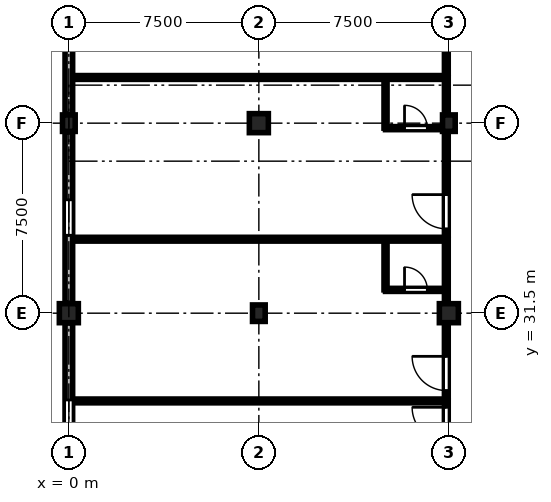
"""IFC4 building model, lengths in metres.
Left out: names, types, materials, properties, quantities, classifications, styles, units other than length and angle.
Written with IfcOpenShell. Run it as: python <this file> out.ifc"""

import sys

from ifc_helpers import new_model, si_unit, direction, frame, frame_2d, origin, origin_2d, place, context, subcontext, project, spatial, rectangle, extrude, element, fill, save


model = new_model("IFC4")
c1 = context("Model", 3, precision=1e-05, world=origin(), true_north=direction((0.0, 1.0)))
c2 = subcontext(c1, "Body", "Model", "MODEL_VIEW")
j1 = project(units=[si_unit("LENGTHUNIT", "METRE"), si_unit("PLANEANGLEUNIT", "RADIAN")], contexts=[c1])
p1 = place(None, origin())
s1 = spatial("IfcSite", under=j1, at=p1, CompositionType="ELEMENT")
p2 = place(p1, origin())
s2 = spatial("IfcBuilding", under=s1, at=p2, CompositionType="ELEMENT")
p3 = place(p2, frame((0.0, 0.0, 14.1)))
s3 = spatial("IfcBuildingStorey", under=s2, at=p3, CompositionType="ELEMENT", Elevation=14.1)
p4 = place(p3, frame((0.0, 31.5, 0.0), z_axis=(0.0, 0.0, 1.0), x_axis=(1.0, 0.0, 0.0)))
e1 = element("IfcColumn", 1, at=p4, inside=s3, PredefinedType="COLUMN", context=c2, shape_type="SweptSolid", body=[
    extrude(rectangle(XDim=0.75, YDim=0.75, at=origin_2d()), origin(), (0.0, 0.0, 1.0), 3.75),
])
for number, where, z_axis, x_axis in (
    (2, (0.0, 39.0, 0.0), (0.0, 0.0, 1.0), (1.0, 0.0, 0.0)),
    (3, (7.5, 31.5, 0.0), (0.0, 0.0, 1.0), (1.0, 0.0, 0.0)),
):
    element("IfcColumn", number, at=place(p3, frame(where, z_axis=z_axis, x_axis=x_axis)), inside=s3, PredefinedType="COLUMN", context=c2, shape_type="SweptSolid", body=[
        extrude(rectangle(XDim=0.5, YDim=0.65, at=origin_2d()), origin(), (0.0, 0.0, 1.0), 3.75),
    ])
for number, where, z_axis, x_axis in (
    (4, (7.5, 39.0, 0.0), (0.0, 0.0, 1.0), (1.0, 0.0, 0.0)),
    (5, (15.0, 31.5, 0.0), (0.0, 0.0, 1.0), (1.0, 0.0, 0.0)),
):
    element("IfcColumn", number, at=place(p3, frame(where, z_axis=z_axis, x_axis=x_axis)), inside=s3, PredefinedType="COLUMN", context=c2, shape_type="SweptSolid", body=[
        extrude(rectangle(XDim=0.75, YDim=0.75, at=origin_2d()), origin(), (0.0, 0.0, 1.0), 3.75),
    ])
p5 = place(p3, frame((15.0, 39.0, 0.0), z_axis=(0.0, 0.0, 1.0), x_axis=(1.0, 0.0, 0.0)))
e6 = element("IfcColumn", 6, at=p5, inside=s3, PredefinedType="COLUMN", context=c2, shape_type="SweptSolid", body=[
    extrude(rectangle(XDim=0.5, YDim=0.65, at=origin_2d()), origin(), (0.0, 0.0, 1.0), 3.75),
])
p6 = place(p3, frame((0.0, 22.835, 0.0), z_axis=(0.0, 0.0, 1.0), x_axis=(0.0, 1.0, 0.0)))
e7 = element("IfcWall", 7, at=p6, inside=s3, PredefinedType="STANDARD", context=c2, shape_type="SweptSolid", body=[
    extrude(rectangle(XDim=8.28, YDim=0.3, at=frame_2d((4.14, 0.0))), origin(), (0.0, 0.0, 1.0), 2.92),
])
p7 = place(p6, frame((3.04, 0.0, 0.9)))
e8 = element("IfcOpeningElement", 8, at=p7, cuts=e7, PredefinedType="OPENING", context=c2, shape_type="SweptSolid", body=[
    extrude(rectangle(XDim=2.2, YDim=1.74, at=frame_2d((1.1, 0.87))), frame((0.0, 0.16, 0.0), z_axis=(0.0, -1.0, 0.0), x_axis=(1.0, 0.0, 0.0)), (0.0, 0.0, 1.0), 0.32),
])
p8 = place(p3, frame((0.0, 31.885, 0.0), z_axis=(0.0, 0.0, 1.0), x_axis=(0.0, 1.0, 0.0)))
e9 = element("IfcWall", 9, at=p8, inside=s3, PredefinedType="STANDARD", context=c2, shape_type="SweptSolid", body=[
    extrude(rectangle(XDim=6.78, YDim=0.3, at=frame_2d((3.39, 0.0))), origin(), (0.0, 0.0, 1.0), 2.87),
])
p9 = place(p8, frame((2.69, 0.0, 0.9)))
e10 = element("IfcOpeningElement", 10, at=p9, cuts=e9, PredefinedType="OPENING", context=c2, shape_type="SweptSolid", body=[
    extrude(rectangle(XDim=1.4, YDim=1.69, at=frame_2d((0.7, 0.845))), frame((0.0, 0.16, 0.0), z_axis=(0.0, -1.0, 0.0), x_axis=(1.0, 0.0, 0.0)), (0.0, 0.0, 1.0), 0.32),
])
p10 = place(p3, frame((0.0, 39.335, 0.0), z_axis=(0.0, 0.0, 1.0), x_axis=(0.0, 1.0, 0.0)))
e11 = element("IfcWall", 11, at=p10, inside=s3, PredefinedType="STANDARD", context=c2, shape_type="SweptSolid", body=[
    extrude(rectangle(XDim=6.78, YDim=0.3, at=frame_2d((3.39, 0.0))), origin(), (0.0, 0.0, 1.0), 2.87),
])
p11 = place(p10, frame((2.59, 0.0, 0.9)))
e12 = element("IfcOpeningElement", 12, at=p11, cuts=e11, PredefinedType="OPENING", context=c2, shape_type="SweptSolid", body=[
    extrude(rectangle(XDim=1.6, YDim=1.69, at=frame_2d((0.8, 0.845))), frame((0.0, 0.16, 0.0), z_axis=(0.0, -1.0, 0.0), x_axis=(1.0, 0.0, 0.0)), (0.0, 0.0, 1.0), 0.32),
])
p12 = place(p3, frame((14.9, 21.813, 0.0), z_axis=(0.0, 0.0, 1.0), x_axis=(0.0, 1.0, 0.0)))
e13 = element("IfcWall", 13, at=p12, inside=s3, PredefinedType="PARTITIONING", context=c2, shape_type="SweptSolid", body=[
    extrude(rectangle(XDim=6.223, YDim=0.15, at=frame_2d((3.112, 0.0))), origin(), (0.0, 0.0, 1.0), 2.755),
])
p13 = place(p12, frame((4.623, 0.0, 0.0)))
e14 = element("IfcOpeningElement", 14, at=p13, cuts=e13, PredefinedType="OPENING", context=c2, shape_type="SweptSolid", body=[
    extrude(rectangle(XDim=1.35, YDim=2.25, at=frame_2d((0.675, 1.125))), frame((0.0, 0.085, 0.0), z_axis=(0.0, -1.0, 0.0), x_axis=(1.0, 0.0, 0.0)), (0.0, 0.0, 1.0), 0.17),
])
p14 = place(p3, frame((14.9, 28.197, 0.0), z_axis=(0.0, 0.0, 1.0), x_axis=(0.0, 1.0, 0.0)))
e15 = element("IfcWall", 15, at=p14, inside=s3, PredefinedType="PARTITIONING", context=c2, shape_type="SweptSolid", body=[
    extrude(rectangle(XDim=6.223, YDim=0.15, at=frame_2d((3.112, 0.0))), origin(), (0.0, 0.0, 1.0), 2.755),
])
p15 = place(p14, frame((0.25, 0.0, 0.0)))
e16 = element("IfcOpeningElement", 16, at=p15, cuts=e15, PredefinedType="OPENING", context=c2, shape_type="SweptSolid", body=[
    extrude(rectangle(XDim=1.35, YDim=2.25, at=frame_2d((0.675, 1.125))), frame((0.0, 0.085, 0.0), z_axis=(0.0, -1.0, 0.0), x_axis=(1.0, 0.0, 0.0)), (0.0, 0.0, 1.0), 0.17),
])
p16 = place(p3, frame((12.5, 32.42, 0.0), z_axis=(0.0, 0.0, 1.0), x_axis=(1.0, 0.0, 0.0)))
e17 = element("IfcWall", 17, at=p16, inside=s3, PredefinedType="PARTITIONING", context=c2, shape_type="SweptSolid", body=[
    extrude(rectangle(XDim=2.4, YDim=0.12, at=frame_2d((1.2, 0.0))), origin(), (0.0, 0.0, 1.0), 3.455),
])
p17 = place(p16, frame((0.75, 0.0, 0.0)))
e18 = element("IfcOpeningElement", 18, at=p17, cuts=e17, PredefinedType="OPENING", context=c2, shape_type="SweptSolid", body=[
    extrude(rectangle(XDim=0.9, YDim=2.1, at=frame_2d((0.45, 1.05))), frame((0.0, 0.07, 0.0), z_axis=(0.0, -1.0, 0.0), x_axis=(1.0, 0.0, 0.0)), (0.0, 0.0, 1.0), 0.14),
])
p18 = place(p3, frame((12.5, 32.42, 0.0), z_axis=(0.0, 0.0, 1.0), x_axis=(0.0, 1.0, 0.0)))
e19 = element("IfcWall", 19, at=p18, inside=s3, PredefinedType="PARTITIONING", context=c2, shape_type="SweptSolid", body=[
    extrude(rectangle(XDim=2.0, YDim=0.12, at=frame_2d((1.0, 0.0))), origin(), (0.0, 0.0, 1.0), 3.455),
])
p19 = place(p3, frame((14.9, 34.58, 0.0), z_axis=(0.0, 0.0, 1.0), x_axis=(0.0, 1.0, 0.0)))
e20 = element("IfcWall", 20, at=p19, inside=s3, PredefinedType="PARTITIONING", context=c2, shape_type="SweptSolid", body=[
    extrude(rectangle(XDim=6.223, YDim=0.15, at=frame_2d((3.112, 0.0))), origin(), (0.0, 0.0, 1.0), 2.905),
])
p20 = place(p19, frame((0.25, 0.0, 0.0)))
e21 = element("IfcOpeningElement", 21, at=p20, cuts=e20, PredefinedType="OPENING", context=c2, shape_type="SweptSolid", body=[
    extrude(rectangle(XDim=1.35, YDim=2.25, at=frame_2d((0.675, 1.125))), frame((0.0, 0.085, 0.0), z_axis=(0.0, -1.0, 0.0), x_axis=(1.0, 0.0, 0.0)), (0.0, 0.0, 1.0), 0.17),
])
p21 = place(p3, frame((12.5, 38.803, 0.0), z_axis=(0.0, 0.0, 1.0), x_axis=(1.0, 0.0, 0.0)))
e22 = element("IfcWall", 22, at=p21, inside=s3, PredefinedType="PARTITIONING", context=c2, shape_type="SweptSolid", body=[
    extrude(rectangle(XDim=2.4, YDim=0.12, at=frame_2d((1.2, 0.0))), origin(), (0.0, 0.0, 1.0), 2.855),
])
p22 = place(p21, frame((0.75, 0.0, 0.0)))
e23 = element("IfcOpeningElement", 23, at=p22, cuts=e22, PredefinedType="OPENING", context=c2, shape_type="SweptSolid", body=[
    extrude(rectangle(XDim=0.9, YDim=2.1, at=frame_2d((0.45, 1.05))), frame((0.0, 0.07, 0.0), z_axis=(0.0, -1.0, 0.0), x_axis=(1.0, 0.0, 0.0)), (0.0, 0.0, 1.0), 0.14),
])
p23 = place(p3, frame((12.5, 38.803, 0.0), z_axis=(0.0, 0.0, 1.0), x_axis=(0.0, 1.0, 0.0)))
e24 = element("IfcWall", 24, at=p23, inside=s3, PredefinedType="PARTITIONING", context=c2, shape_type="SweptSolid", body=[
    extrude(rectangle(XDim=2.0, YDim=0.12, at=frame_2d((1.0, 0.0))), origin(), (0.0, 0.0, 1.0), 3.455),
])
p24 = place(p3, frame((14.9, 40.963, 0.0), z_axis=(0.0, 0.0, 1.0), x_axis=(0.0, 1.0, 0.0)))
e25 = element("IfcWall", 25, at=p24, inside=s3, PredefinedType="PARTITIONING", context=c2, shape_type="SweptSolid", body=[
    extrude(rectangle(XDim=6.223, YDim=0.15, at=frame_2d((3.112, 0.0))), origin(), (0.0, 0.0, 1.0), 2.905),
])
p25 = place(p24, frame((1.125, 0.0, 0.0)))
e26 = element("IfcOpeningElement", 26, at=p25, cuts=e25, PredefinedType="OPENING", context=c2, shape_type="SweptSolid", body=[
    extrude(rectangle(XDim=1.35, YDim=2.25, at=frame_2d((0.675, 1.125))), frame((0.0, 0.085, 0.0), z_axis=(0.0, -1.0, 0.0), x_axis=(1.0, 0.0, 0.0)), (0.0, 0.0, 1.0), 0.17),
])
for number, where, z_axis, x_axis in (
    (27, (0.35, 28.037, 0.0), (0.0, 0.0, 1.0), (1.0, 0.0, 0.0)),
    (28, (0.35, 34.42, 0.0), (0.0, 0.0, 1.0), (1.0, 0.0, 0.0)),
    (29, (0.35, 40.803, 0.0), (0.0, 0.0, 1.0), (1.0, 0.0, 0.0)),
):
    element("IfcWall", number, at=place(p3, frame(where, z_axis=z_axis, x_axis=x_axis)), inside=s3, PredefinedType="PARTITIONING", context=c2, shape_type="SweptSolid", body=[
        extrude(rectangle(XDim=14.55, YDim=0.15, at=frame_2d((7.275, 0.0))), origin(), (0.0, 0.0, 1.0), 3.455),
    ])
p26 = place(p7, origin())
e30 = element("IfcWindow", 30, at=p26, inside=s3, PartitioningType="SINGLE_PANEL", PredefinedType="WINDOW", context=c2, shape_type="SweptSolid", body=[
    extrude(rectangle(XDim=2.2, YDim=1.74, at=frame_2d((1.1, 0.87))), frame((0.0, 0.03, 0.0), z_axis=(0.0, -1.0, 0.0), x_axis=(1.0, 0.0, 0.0)), (0.0, 0.0, 1.0), 0.06),
])
fill(e8, e30)
p27 = place(p9, origin())
e31 = element("IfcWindow", 31, at=p27, inside=s3, PartitioningType="SINGLE_PANEL", PredefinedType="WINDOW", context=c2, shape_type="SweptSolid", body=[
    extrude(rectangle(XDim=1.4, YDim=1.69, at=frame_2d((0.7, 0.845))), frame((0.0, 0.03, 0.0), z_axis=(0.0, -1.0, 0.0), x_axis=(1.0, 0.0, 0.0)), (0.0, 0.0, 1.0), 0.06),
])
fill(e10, e31)
p28 = place(p13, origin())
e32 = element("IfcDoor", 32, at=p28, inside=s3, OperationType="SINGLE_SWING_RIGHT", PredefinedType="DOOR", context=c2, shape_type="SweptSolid", body=[
    extrude(rectangle(XDim=1.35, YDim=2.25, at=frame_2d((0.675, 1.125))), frame((0.0, 0.025, 0.0), z_axis=(0.0, -1.0, 0.0), x_axis=(1.0, 0.0, 0.0)), (0.0, 0.0, 1.0), 0.05),
])
fill(e14, e32)
p29 = place(p15, origin())
e33 = element("IfcDoor", 33, at=p29, inside=s3, OperationType="SINGLE_SWING_RIGHT", PredefinedType="DOOR", context=c2, shape_type="SweptSolid", body=[
    extrude(rectangle(XDim=1.35, YDim=2.25, at=frame_2d((0.675, 1.125))), frame((0.0, 0.025, 0.0), z_axis=(0.0, -1.0, 0.0), x_axis=(1.0, 0.0, 0.0)), (0.0, 0.0, 1.0), 0.05),
])
fill(e16, e33)
p30 = place(p17, origin())
e34 = element("IfcDoor", 34, at=p30, inside=s3, OperationType="SINGLE_SWING_LEFT", PredefinedType="DOOR", context=c2, shape_type="SweptSolid", body=[
    extrude(rectangle(XDim=0.9, YDim=2.1, at=frame_2d((0.45, 1.05))), frame((0.0, 0.025, 0.0), z_axis=(0.0, -1.0, 0.0), x_axis=(1.0, 0.0, 0.0)), (0.0, 0.0, 1.0), 0.05),
])
fill(e18, e34)
p31 = place(p20, origin())
e35 = element("IfcDoor", 35, at=p31, inside=s3, OperationType="SINGLE_SWING_RIGHT", PredefinedType="DOOR", context=c2, shape_type="SweptSolid", body=[
    extrude(rectangle(XDim=1.35, YDim=2.25, at=frame_2d((0.675, 1.125))), frame((0.0, 0.025, 0.0), z_axis=(0.0, -1.0, 0.0), x_axis=(1.0, 0.0, 0.0)), (0.0, 0.0, 1.0), 0.05),
])
fill(e21, e35)
p32 = place(p22, origin())
e36 = element("IfcDoor", 36, at=p32, inside=s3, OperationType="SINGLE_SWING_LEFT", PredefinedType="DOOR", context=c2, shape_type="SweptSolid", body=[
    extrude(rectangle(XDim=0.9, YDim=2.1, at=frame_2d((0.45, 1.05))), frame((0.0, 0.025, 0.0), z_axis=(0.0, -1.0, 0.0), x_axis=(1.0, 0.0, 0.0)), (0.0, 0.0, 1.0), 0.05),
])
fill(e23, e36)
save(model, sys.argv[1])
